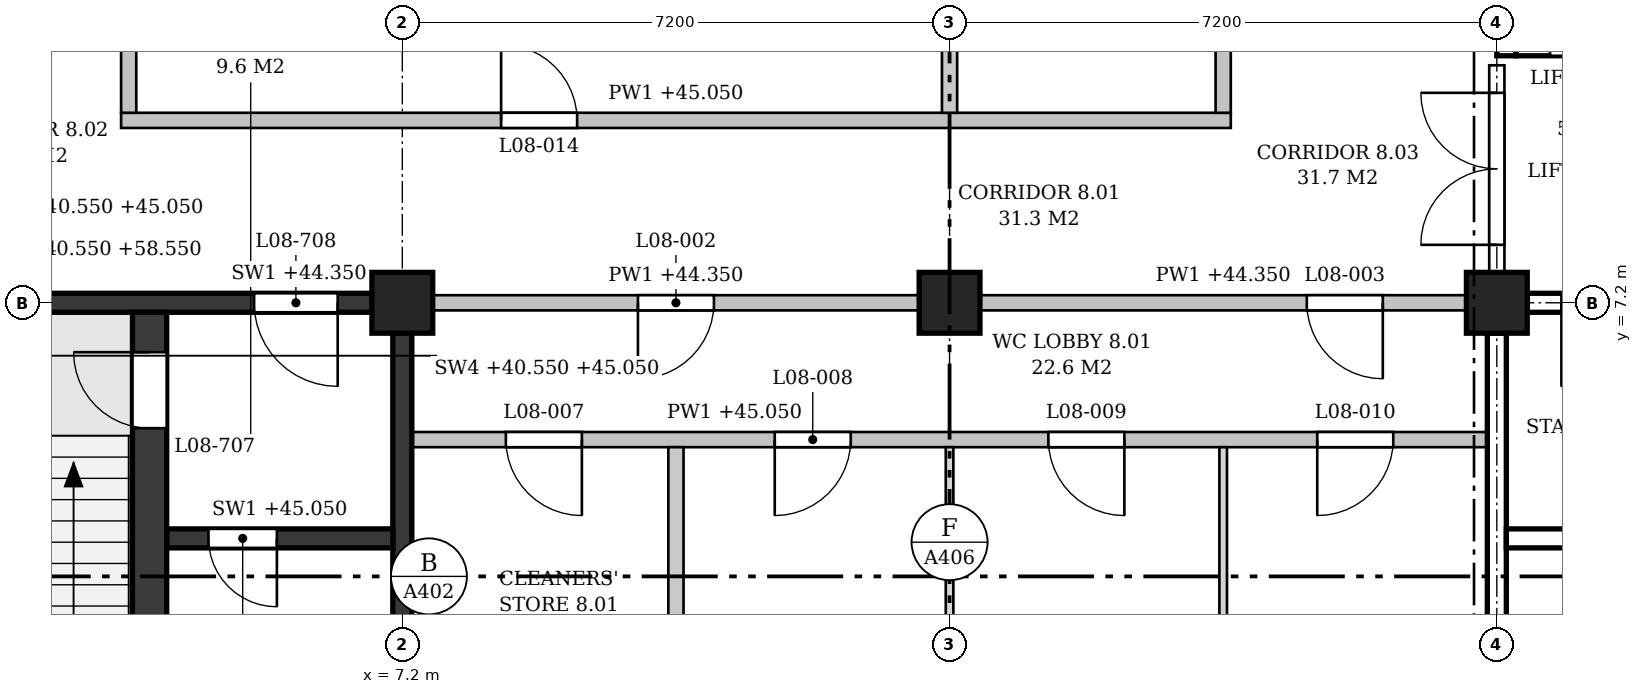
"""IFC4 building model, lengths in metres.
Left out: names, types, materials, properties, quantities, classifications, styles, units other than length and angle.
Written with IfcOpenShell. Run it as: python <this file> out.ifc"""

import sys

from ifc_helpers import new_model, si_unit, direction, frame, frame_2d, origin, origin_2d, place, context, subcontext, project, spatial, polyline, rectangle, outline, extrude, element, fill, save


model = new_model("IFC4")
c1 = context("Model", 3, precision=1e-05, world=origin(), true_north=direction((0.0, 1.0)))
c2 = subcontext(c1, "Body", "Model", "MODEL_VIEW")
j1 = project(units=[si_unit("LENGTHUNIT", "METRE"), si_unit("PLANEANGLEUNIT", "RADIAN")], contexts=[c1])
p1 = place(None, origin())
s1 = spatial("IfcSite", under=j1, at=p1, CompositionType="ELEMENT")
p2 = place(p1, origin())
s2 = spatial("IfcBuilding", under=s1, at=p2, CompositionType="ELEMENT")
p3 = place(p2, frame((0.0, 0.0, 40.8)))
s3 = spatial("IfcBuildingStorey", under=s2, at=p3, CompositionType="ELEMENT", Elevation=40.8)
for number, where, z_axis, x_axis in (
    (1, (7.2, 7.2, 0.0), (0.0, 0.0, 1.0), (1.0, 0.0, 0.0)),
    (2, (14.4, 7.2, 0.0), (0.0, 0.0, 1.0), (1.0, 0.0, 0.0)),
    (3, (21.6, 7.2, 0.0), (0.0, 0.0, 1.0), (1.0, 0.0, 0.0)),
):
    element("IfcColumn", number, at=place(p3, frame(where, z_axis=z_axis, x_axis=x_axis)), inside=s3, PredefinedType="COLUMN", context=c2, shape_type="SweptSolid", body=[
        extrude(rectangle(XDim=0.8, YDim=0.8, at=origin_2d()), origin(), (0.0, 0.0, 1.0), 4.5),
    ])
p4 = place(p3, frame((0.4, 7.2, 0.0), z_axis=(0.0, 0.0, 1.0), x_axis=(1.0, 0.0, 0.0)))
e4 = element("IfcWall", 4, at=p4, inside=s3, PredefinedType="SHEAR", context=c2, shape_type="SweptSolid", body=[
    extrude(rectangle(XDim=6.4, YDim=0.25, at=frame_2d((3.2, 0.0))), origin(), (0.0, 0.0, 1.0), 3.55),
])
p5 = place(p4, frame((4.85, 0.0, 0.0)))
e5 = element("IfcOpeningElement", 5, at=p5, cuts=e4, PredefinedType="OPENING", context=c2, shape_type="SweptSolid", body=[
    extrude(rectangle(XDim=1.1, YDim=2.1, at=frame_2d((0.55, 1.05))), frame((0.0, 0.135, 0.0), z_axis=(0.0, -1.0, 0.0), x_axis=(1.0, 0.0, 0.0)), (0.0, 0.0, 1.0), 0.27),
])
p6 = place(p3, frame((7.2, 0.4, 0.0), z_axis=(0.0, 0.0, 1.0), x_axis=(0.0, 1.0, 0.0)))
e6 = element("IfcWall", 6, at=p6, inside=s3, PredefinedType="SHEAR", context=c2, shape_type="SweptSolid", body=[
    extrude(rectangle(XDim=6.4, YDim=0.25, at=frame_2d((3.2, 0.0))), origin(), (0.0, 0.0, 1.0), 3.55),
])
p7 = place(p3, frame((3.875, 0.15, 0.0), z_axis=(0.0, 0.0, 1.0), x_axis=(0.0, 1.0, 0.0)))
e7 = element("IfcWall", 7, at=p7, inside=s3, PredefinedType="SHEAR", context=c2, shape_type="SweptSolid", body=[
    extrude(rectangle(XDim=6.925, YDim=0.45, at=frame_2d((3.462, 0.0))), origin(), (0.0, 0.0, 1.0), 4.25),
])
p8 = place(p7, frame((5.4, 0.0, 0.0)))
e8 = element("IfcOpeningElement", 8, at=p8, cuts=e7, PredefinedType="OPENING", context=c2, shape_type="SweptSolid", body=[
    extrude(rectangle(XDim=1.0, YDim=2.1, at=frame_2d((0.5, 1.05))), frame((0.0, 0.235, 0.0), z_axis=(0.0, -1.0, 0.0), x_axis=(1.0, 0.0, 0.0)), (0.0, 0.0, 1.0), 0.47),
])
p9 = place(p3, frame((4.1, 4.1, 0.0), z_axis=(0.0, 0.0, 1.0), x_axis=(1.0, 0.0, 0.0)))
e9 = element("IfcWall", 9, at=p9, inside=s3, PredefinedType="SHEAR", context=c2, shape_type="SweptSolid", body=[
    extrude(rectangle(XDim=2.975, YDim=0.25, at=frame_2d((1.487, 0.0))), origin(), (0.0, 0.0, 1.0), 4.25),
])
p10 = place(p9, frame((0.55, 0.0, 0.0)))
e10 = element("IfcOpeningElement", 10, at=p10, cuts=e9, PredefinedType="OPENING", context=c2, shape_type="SweptSolid", body=[
    extrude(rectangle(XDim=0.9, YDim=2.1, at=frame_2d((0.45, 1.05))), frame((0.0, 0.135, 0.0), z_axis=(0.0, -1.0, 0.0), x_axis=(1.0, 0.0, 0.0)), (0.0, 0.0, 1.0), 0.27),
])
p11 = place(p3, frame((22.0, 7.2, 0.0), z_axis=(0.0, 0.0, 1.0), x_axis=(1.0, 0.0, 0.0)))
e11 = element("IfcWall", 11, at=p11, inside=s3, PredefinedType="SHEAR", context=c2, shape_type="SweptSolid", body=[
    extrude(rectangle(XDim=6.4, YDim=0.25, at=frame_2d((3.2, 0.0))), origin(), (0.0, 0.0, 1.0), 3.55),
])
p12 = place(p11, frame((0.45, 0.0, 0.0)))
e12 = element("IfcOpeningElement", 12, at=p12, cuts=e11, PredefinedType="OPENING", context=c2, shape_type="SweptSolid", body=[
    extrude(rectangle(XDim=1.1, YDim=2.1, at=frame_2d((0.55, 1.05))), frame((0.0, 0.135, 0.0), z_axis=(0.0, -1.0, 0.0), x_axis=(1.0, 0.0, 0.0)), (0.0, 0.0, 1.0), 0.27),
])
p13 = place(p3, frame((21.6, 0.4, 0.0), z_axis=(0.0, 0.0, 1.0), x_axis=(0.0, 1.0, 0.0)))
e13 = element("IfcWall", 13, at=p13, inside=s3, PredefinedType="SHEAR", context=c2, shape_type="SweptSolid", body=[
    extrude(rectangle(XDim=6.4, YDim=0.25, at=frame_2d((3.2, 0.0))), origin(), (0.0, 0.0, 1.0), 3.55),
])
p14 = place(p3, frame((21.725, 4.1, 0.0), z_axis=(0.0, 0.0, 1.0), x_axis=(1.0, 0.0, 0.0)))
e14 = element("IfcWall", 14, at=p14, inside=s3, PredefinedType="SHEAR", context=c2, shape_type="SweptSolid", body=[
    extrude(rectangle(XDim=2.975, YDim=0.25, at=frame_2d((1.487, 0.0))), origin(), (0.0, 0.0, 1.0), 4.25),
])
p15 = place(p14, frame((1.525, 0.0, 0.0)))
e15 = element("IfcOpeningElement", 15, at=p15, cuts=e14, PredefinedType="OPENING", context=c2, shape_type="SweptSolid", body=[
    extrude(rectangle(XDim=0.9, YDim=2.1, at=frame_2d((0.45, 1.05))), frame((0.0, 0.135, 0.0), z_axis=(0.0, -1.0, 0.0), x_axis=(1.0, 0.0, 0.0)), (0.0, 0.0, 1.0), 0.27),
])
p16 = place(p3, frame((21.725, 10.45, -0.25), z_axis=(0.0, 0.0, 1.0), x_axis=(0.0, 1.0, 0.0)))
e16 = element("IfcWall", 16, at=p16, inside=s3, PredefinedType="SHEAR", context=c2, shape_type="SweptSolid", body=[
    extrude(rectangle(XDim=3.55, YDim=0.25, at=frame_2d((1.775, 0.0))), origin(), (0.0, 0.0, 1.0), 3.8),
])
p17 = place(p3, frame((21.85, 10.575, -0.25), z_axis=(0.0, 0.0, 1.0), x_axis=(1.0, 0.0, 0.0)))
e17 = element("IfcWall", 17, at=p17, inside=s3, PredefinedType="SHEAR", context=c2, shape_type="SweptSolid", body=[
    extrude(rectangle(XDim=2.0, YDim=0.25, at=frame_2d((1.0, 0.0))), origin(), (0.0, 0.0, 1.0), 4.5),
])
p18 = place(p17, frame((0.45, 0.0, 0.25)))
e18 = element("IfcOpeningElement", 18, at=p18, cuts=e17, PredefinedType="OPENING", context=c2, shape_type="SweptSolid", body=[
    extrude(rectangle(XDim=1.1, YDim=2.1, at=frame_2d((0.55, 1.05))), frame((0.0, 0.135, 0.0), z_axis=(0.0, -1.0, 0.0), x_axis=(1.0, 0.0, 0.0)), (0.0, 0.0, 1.0), 0.27),
])
p19 = place(p3, frame((7.325, 5.4, 0.0), z_axis=(0.0, 0.0, 1.0), x_axis=(1.0, 0.0, 0.0)))
e19 = element("IfcWall", 19, at=p19, inside=s3, PredefinedType="PARTITIONING", context=c2, shape_type="SweptSolid", body=[
    extrude(outline(polyline([(0.0, 0.0), (14.15, 0.0), (14.15, 3.55), (14.05, 3.55), (14.05, 4.25), (7.3, 4.25), (7.3, 3.55), (6.85, 3.55), (6.85, 4.25), (0.1, 4.25), (0.1, 3.55), (0.0, 3.55), (0.0, 0.0)])), frame((0.0, 0.1, 0.0), z_axis=(0.0, -1.0, 0.0), x_axis=(1.0, 0.0, 0.0)), (0.0, 0.0, 1.0), 0.2),
])
p20 = place(p19, frame((1.238, 0.0, 0.0)))
e20 = element("IfcOpeningElement", 20, at=p20, cuts=e19, PredefinedType="OPENING", context=c2, shape_type="SweptSolid", body=[
    extrude(rectangle(XDim=1.0, YDim=2.1, at=frame_2d((0.5, 1.05))), frame((0.0, 0.11, 0.0), z_axis=(0.0, -1.0, 0.0), x_axis=(1.0, 0.0, 0.0)), (0.0, 0.0, 1.0), 0.22),
])
p21 = place(p19, frame((4.775, 0.0, 0.0)))
e21 = element("IfcOpeningElement", 21, at=p21, cuts=e19, PredefinedType="OPENING", context=c2, shape_type="SweptSolid", body=[
    extrude(rectangle(XDim=1.0, YDim=2.1, at=frame_2d((0.5, 1.05))), frame((0.0, 0.11, 0.0), z_axis=(0.0, -1.0, 0.0), x_axis=(1.0, 0.0, 0.0)), (0.0, 0.0, 1.0), 0.22),
])
p22 = place(p19, frame((8.375, 0.0, 0.0)))
e22 = element("IfcOpeningElement", 22, at=p22, cuts=e19, PredefinedType="OPENING", context=c2, shape_type="SweptSolid", body=[
    extrude(rectangle(XDim=1.0, YDim=2.1, at=frame_2d((0.5, 1.05))), frame((0.0, 0.11, 0.0), z_axis=(0.0, -1.0, 0.0), x_axis=(1.0, 0.0, 0.0)), (0.0, 0.0, 1.0), 0.22),
])
p23 = place(p19, frame((11.913, 0.0, 0.0)))
e23 = element("IfcOpeningElement", 23, at=p23, cuts=e19, PredefinedType="OPENING", context=c2, shape_type="SweptSolid", body=[
    extrude(rectangle(XDim=1.0, YDim=2.1, at=frame_2d((0.5, 1.05))), frame((0.0, 0.11, 0.0), z_axis=(0.0, -1.0, 0.0), x_axis=(1.0, 0.0, 0.0)), (0.0, 0.0, 1.0), 0.22),
])
p24 = place(p3, frame((7.6, 7.2, 0.0), z_axis=(0.0, 0.0, 1.0), x_axis=(1.0, 0.0, 0.0)))
e24 = element("IfcWall", 24, at=p24, inside=s3, PredefinedType="PARTITIONING", context=c2, shape_type="SweptSolid", body=[
    extrude(rectangle(XDim=6.4, YDim=0.2, at=frame_2d((3.2, 0.0))), origin(), (0.0, 0.0, 1.0), 3.55),
])
p25 = place(p24, frame((2.7, 0.0, 0.0)))
e25 = element("IfcOpeningElement", 25, at=p25, cuts=e24, PredefinedType="OPENING", context=c2, shape_type="SweptSolid", body=[
    extrude(rectangle(XDim=1.0, YDim=2.1, at=frame_2d((0.5, 1.05))), frame((0.0, 0.11, 0.0), z_axis=(0.0, -1.0, 0.0), x_axis=(1.0, 0.0, 0.0)), (0.0, 0.0, 1.0), 0.22),
])
p26 = place(p3, frame((14.8, 7.2, 0.0), z_axis=(0.0, 0.0, 1.0), x_axis=(1.0, 0.0, 0.0)))
e26 = element("IfcWall", 26, at=p26, inside=s3, PredefinedType="PARTITIONING", context=c2, shape_type="SweptSolid", body=[
    extrude(rectangle(XDim=6.4, YDim=0.2, at=frame_2d((3.2, 0.0))), origin(), (0.0, 0.0, 1.0), 3.55),
])
p27 = place(p26, frame((4.3, 0.0, 0.0)))
e27 = element("IfcOpeningElement", 27, at=p27, cuts=e26, PredefinedType="OPENING", context=c2, shape_type="SweptSolid", body=[
    extrude(rectangle(XDim=1.0, YDim=2.1, at=frame_2d((0.5, 1.05))), frame((0.0, 0.11, 0.0), z_axis=(0.0, -1.0, 0.0), x_axis=(1.0, 0.0, 0.0)), (0.0, 0.0, 1.0), 0.22),
])
p28 = place(p3, frame((3.5, 9.6, 0.0), z_axis=(0.0, 0.0, 1.0), x_axis=(1.0, 0.0, 0.0)))
e28 = element("IfcWall", 28, at=p28, inside=s3, PredefinedType="PARTITIONING", context=c2, shape_type="SweptSolid", body=[
    extrude(outline(polyline([(0.0, 0.0), (14.6, 0.0), (14.6, 4.25), (11.125, 4.25), (11.125, 3.55), (10.675, 3.55), (10.675, 4.25), (3.925, 4.25), (3.925, 3.55), (3.475, 3.55), (3.475, 4.25), (0.0, 4.25), (0.0, 0.0)])), frame((0.0, 0.1, 0.0), z_axis=(0.0, -1.0, 0.0), x_axis=(1.0, 0.0, 0.0)), (0.0, 0.0, 1.0), 0.2),
])
p29 = place(p28, frame((5.0, 0.0, 0.0)))
e29 = element("IfcOpeningElement", 29, at=p29, cuts=e28, PredefinedType="OPENING", context=c2, shape_type="SweptSolid", body=[
    extrude(rectangle(XDim=1.0, YDim=2.1, at=frame_2d((0.5, 1.05))), frame((0.0, 0.11, 0.0), z_axis=(0.0, -1.0, 0.0), x_axis=(1.0, 0.0, 0.0)), (0.0, 0.0, 1.0), 0.22),
])
p30 = place(p3, frame((3.6, 9.7, 0.0), z_axis=(0.0, 0.0, 1.0), x_axis=(0.0, 1.0, 0.0)))
e30 = element("IfcWall", 30, at=p30, inside=s3, PredefinedType="PARTITIONING", context=c2, shape_type="SweptSolid", body=[
    extrude(rectangle(XDim=1.1, YDim=0.2, at=frame_2d((0.55, 0.0))), origin(), (0.0, 0.0, 1.0), 4.25),
])
p31 = place(p3, frame((10.8, 0.15, 0.0), z_axis=(0.0, 0.0, 1.0), x_axis=(0.0, 1.0, 0.0)))
e31 = element("IfcWall", 31, at=p31, inside=s3, PredefinedType="PARTITIONING", context=c2, shape_type="SweptSolid", body=[
    extrude(outline(polyline([(0.0, 0.0), (5.15, 0.0), (5.15, 4.25), (0.05, 4.25), (0.05, 3.65), (0.0, 3.65), (0.0, 0.0)])), frame((0.0, 0.1, 0.0), z_axis=(0.0, -1.0, 0.0), x_axis=(1.0, 0.0, 0.0)), (0.0, 0.0, 1.0), 0.2),
])
p32 = place(p3, frame((14.4, 0.4, 0.0), z_axis=(0.0, 0.0, 1.0), x_axis=(0.0, 1.0, 0.0)))
e32 = element("IfcWall", 32, at=p32, inside=s3, PredefinedType="PARTITIONING", context=c2, shape_type="SweptSolid", body=[
    extrude(rectangle(XDim=4.9, YDim=0.1, at=frame_2d((2.45, 0.0))), origin(), (0.0, 0.0, 1.0), 3.55),
])
p33 = place(p3, frame((14.4, 9.7, 0.0), z_axis=(0.0, 0.0, 1.0), x_axis=(0.0, 1.0, 0.0)))
e33 = element("IfcWall", 33, at=p33, inside=s3, PredefinedType="PARTITIONING", context=c2, shape_type="SweptSolid", body=[
    extrude(rectangle(XDim=4.3, YDim=0.2, at=frame_2d((2.15, 0.0))), origin(), (0.0, 0.0, 1.0), 3.55),
])
p34 = place(p3, frame((18.0, 0.15, 0.0), z_axis=(0.0, 0.0, 1.0), x_axis=(0.0, 1.0, 0.0)))
e34 = element("IfcWall", 34, at=p34, inside=s3, PredefinedType="PARTITIONING", context=c2, shape_type="SweptSolid", body=[
    extrude(rectangle(XDim=5.15, YDim=0.1, at=frame_2d((2.575, 0.0))), origin(), (0.0, 0.0, 1.0), 3.55),
])
p35 = place(p3, frame((18.0, 9.7, 0.0), z_axis=(0.0, 0.0, 1.0), x_axis=(0.0, 1.0, 0.0)))
e35 = element("IfcWall", 35, at=p35, inside=s3, PredefinedType="PARTITIONING", context=c2, shape_type="SweptSolid", body=[
    extrude(outline(polyline([(0.0, 0.0), (7.1, 0.0), (7.1, 4.25), (4.925, 4.25), (4.925, 3.55), (4.475, 3.55), (4.475, 4.25), (0.0, 4.25), (0.0, 0.0)])), frame((0.0, 0.1, 0.0), z_axis=(0.0, -1.0, 0.0), x_axis=(1.0, 0.0, 0.0)), (0.0, 0.0, 1.0), 0.2),
])
p36 = place(p35, frame((3.05, 0.0, 0.0)))
e36 = element("IfcOpeningElement", 36, at=p36, cuts=e35, PredefinedType="OPENING", context=c2, shape_type="SweptSolid", body=[
    extrude(rectangle(XDim=1.0, YDim=2.1, at=frame_2d((0.5, 1.05))), frame((0.0, 0.11, 0.0), z_axis=(0.0, -1.0, 0.0), x_axis=(1.0, 0.0, 0.0)), (0.0, 0.0, 1.0), 0.22),
])
p37 = place(p3, frame((21.6, 7.6, 0.0), z_axis=(0.0, 0.0, 1.0), x_axis=(0.0, 1.0, 0.0)))
e37 = element("IfcWall", 37, at=p37, inside=s3, PredefinedType="PARTITIONING", context=c2, shape_type="SweptSolid", body=[
    extrude(rectangle(XDim=2.725, YDim=0.2, at=frame_2d((1.362, 0.0))), origin(), (0.0, 0.0, 1.0), 3.55),
])
p38 = place(p37, frame((0.362, 0.0, 0.0)))
e38 = element("IfcOpeningElement", 38, at=p38, cuts=e37, PredefinedType="OPENING", context=c2, shape_type="SweptSolid", body=[
    extrude(rectangle(XDim=2.0, YDim=2.4, at=frame_2d((1.0, 1.2))), frame((0.0, 0.11, 0.0), z_axis=(0.0, -1.0, 0.0), x_axis=(1.0, 0.0, 0.0)), (0.0, 0.0, 1.0), 0.22),
])
p39 = place(p8, origin())
e39 = element("IfcDoor", 39, at=p39, inside=s3, OperationType="SINGLE_SWING_RIGHT", PredefinedType="DOOR", context=c2, shape_type="SweptSolid", body=[
    extrude(rectangle(XDim=1.0, YDim=2.1, at=frame_2d((0.5, 1.05))), frame((0.0, 0.025, 0.0), z_axis=(0.0, -1.0, 0.0), x_axis=(1.0, 0.0, 0.0)), (0.0, 0.0, 1.0), 0.05),
])
fill(e8, e39)
p40 = place(p5, frame((1.1, 0.0, 0.0), z_axis=(0.0, 0.0, 1.0), x_axis=(-1.0, 0.0, 0.0)))
e40 = element("IfcDoor", 40, at=p40, inside=s3, OperationType="SINGLE_SWING_LEFT", PredefinedType="DOOR", context=c2, shape_type="SweptSolid", body=[
    extrude(rectangle(XDim=1.1, YDim=2.1, at=frame_2d((0.55, 1.05))), frame((0.0, 0.025, 0.0), z_axis=(0.0, -1.0, 0.0), x_axis=(1.0, 0.0, 0.0)), (0.0, 0.0, 1.0), 0.05),
])
fill(e5, e40)
p41 = place(p10, frame((0.9, 0.0, 0.0), z_axis=(0.0, 0.0, 1.0), x_axis=(-1.0, 0.0, 0.0)))
e41 = element("IfcDoor", 41, at=p41, inside=s3, OperationType="SINGLE_SWING_LEFT", PredefinedType="DOOR", context=c2, shape_type="SweptSolid", body=[
    extrude(rectangle(XDim=0.9, YDim=2.1, at=frame_2d((0.45, 1.05))), frame((0.0, 0.025, 0.0), z_axis=(0.0, -1.0, 0.0), x_axis=(1.0, 0.0, 0.0)), (0.0, 0.0, 1.0), 0.05),
])
fill(e10, e41)
p42 = place(p12, frame((1.1, 0.0, 0.0), z_axis=(0.0, 0.0, 1.0), x_axis=(-1.0, 0.0, 0.0)))
e42 = element("IfcDoor", 42, at=p42, inside=s3, OperationType="SINGLE_SWING_RIGHT", PredefinedType="DOOR", context=c2, shape_type="SweptSolid", body=[
    extrude(rectangle(XDim=1.1, YDim=2.1, at=frame_2d((0.55, 1.05))), frame((0.0, 0.025, 0.0), z_axis=(0.0, -1.0, 0.0), x_axis=(1.0, 0.0, 0.0)), (0.0, 0.0, 1.0), 0.05),
])
fill(e12, e42)
p43 = place(p38, origin())
e43 = element("IfcDoor", 43, at=p43, inside=s3, OperationType="DOUBLE_DOOR_SINGLE_SWING", PredefinedType="DOOR", context=c2, shape_type="SweptSolid", body=[
    extrude(rectangle(XDim=2.0, YDim=2.4, at=frame_2d((1.0, 1.2))), frame((0.0, 0.025, 0.0), z_axis=(0.0, -1.0, 0.0), x_axis=(1.0, 0.0, 0.0)), (0.0, 0.0, 1.0), 0.05),
])
fill(e38, e43)
p44 = place(p25, frame((1.0, 0.0, 0.0), z_axis=(0.0, 0.0, 1.0), x_axis=(-1.0, 0.0, 0.0)))
e44 = element("IfcDoor", 44, at=p44, inside=s3, OperationType="SINGLE_SWING_RIGHT", PredefinedType="DOOR", context=c2, shape_type="SweptSolid", body=[
    extrude(rectangle(XDim=1.0, YDim=2.1, at=frame_2d((0.5, 1.05))), frame((0.0, 0.025, 0.0), z_axis=(0.0, -1.0, 0.0), x_axis=(1.0, 0.0, 0.0)), (0.0, 0.0, 1.0), 0.05),
])
fill(e25, e44)
p45 = place(p27, frame((1.0, 0.0, 0.0), z_axis=(0.0, 0.0, 1.0), x_axis=(-1.0, 0.0, 0.0)))
e45 = element("IfcDoor", 45, at=p45, inside=s3, OperationType="SINGLE_SWING_LEFT", PredefinedType="DOOR", context=c2, shape_type="SweptSolid", body=[
    extrude(rectangle(XDim=1.0, YDim=2.1, at=frame_2d((0.5, 1.05))), frame((0.0, 0.025, 0.0), z_axis=(0.0, -1.0, 0.0), x_axis=(1.0, 0.0, 0.0)), (0.0, 0.0, 1.0), 0.05),
])
fill(e27, e45)
p46 = place(p20, frame((1.0, 0.0, 0.0), z_axis=(0.0, 0.0, 1.0), x_axis=(-1.0, 0.0, 0.0)))
e46 = element("IfcDoor", 46, at=p46, inside=s3, OperationType="SINGLE_SWING_LEFT", PredefinedType="DOOR", context=c2, shape_type="SweptSolid", body=[
    extrude(rectangle(XDim=1.0, YDim=2.1, at=frame_2d((0.5, 1.05))), frame((0.0, 0.025, 0.0), z_axis=(0.0, -1.0, 0.0), x_axis=(1.0, 0.0, 0.0)), (0.0, 0.0, 1.0), 0.05),
])
fill(e20, e46)
p47 = place(p21, frame((1.0, 0.0, 0.0), z_axis=(0.0, 0.0, 1.0), x_axis=(-1.0, 0.0, 0.0)))
e47 = element("IfcDoor", 47, at=p47, inside=s3, OperationType="SINGLE_SWING_RIGHT", PredefinedType="DOOR", context=c2, shape_type="SweptSolid", body=[
    extrude(rectangle(XDim=1.0, YDim=2.1, at=frame_2d((0.5, 1.05))), frame((0.0, 0.025, 0.0), z_axis=(0.0, -1.0, 0.0), x_axis=(1.0, 0.0, 0.0)), (0.0, 0.0, 1.0), 0.05),
])
fill(e21, e47)
p48 = place(p22, frame((1.0, 0.0, 0.0), z_axis=(0.0, 0.0, 1.0), x_axis=(-1.0, 0.0, 0.0)))
e48 = element("IfcDoor", 48, at=p48, inside=s3, OperationType="SINGLE_SWING_LEFT", PredefinedType="DOOR", context=c2, shape_type="SweptSolid", body=[
    extrude(rectangle(XDim=1.0, YDim=2.1, at=frame_2d((0.5, 1.05))), frame((0.0, 0.025, 0.0), z_axis=(0.0, -1.0, 0.0), x_axis=(1.0, 0.0, 0.0)), (0.0, 0.0, 1.0), 0.05),
])
fill(e22, e48)
p49 = place(p23, frame((1.0, 0.0, 0.0), z_axis=(0.0, 0.0, 1.0), x_axis=(-1.0, 0.0, 0.0)))
e49 = element("IfcDoor", 49, at=p49, inside=s3, OperationType="SINGLE_SWING_RIGHT", PredefinedType="DOOR", context=c2, shape_type="SweptSolid", body=[
    extrude(rectangle(XDim=1.0, YDim=2.1, at=frame_2d((0.5, 1.05))), frame((0.0, 0.025, 0.0), z_axis=(0.0, -1.0, 0.0), x_axis=(1.0, 0.0, 0.0)), (0.0, 0.0, 1.0), 0.05),
])
fill(e23, e49)
p50 = place(p29, origin())
e50 = element("IfcDoor", 50, at=p50, inside=s3, OperationType="SINGLE_SWING_LEFT", PredefinedType="DOOR", context=c2, shape_type="SweptSolid", body=[
    extrude(rectangle(XDim=1.0, YDim=2.1, at=frame_2d((0.5, 1.05))), frame((0.0, 0.025, 0.0), z_axis=(0.0, -1.0, 0.0), x_axis=(1.0, 0.0, 0.0)), (0.0, 0.0, 1.0), 0.05),
])
fill(e29, e50)
save(model, sys.argv[1])
